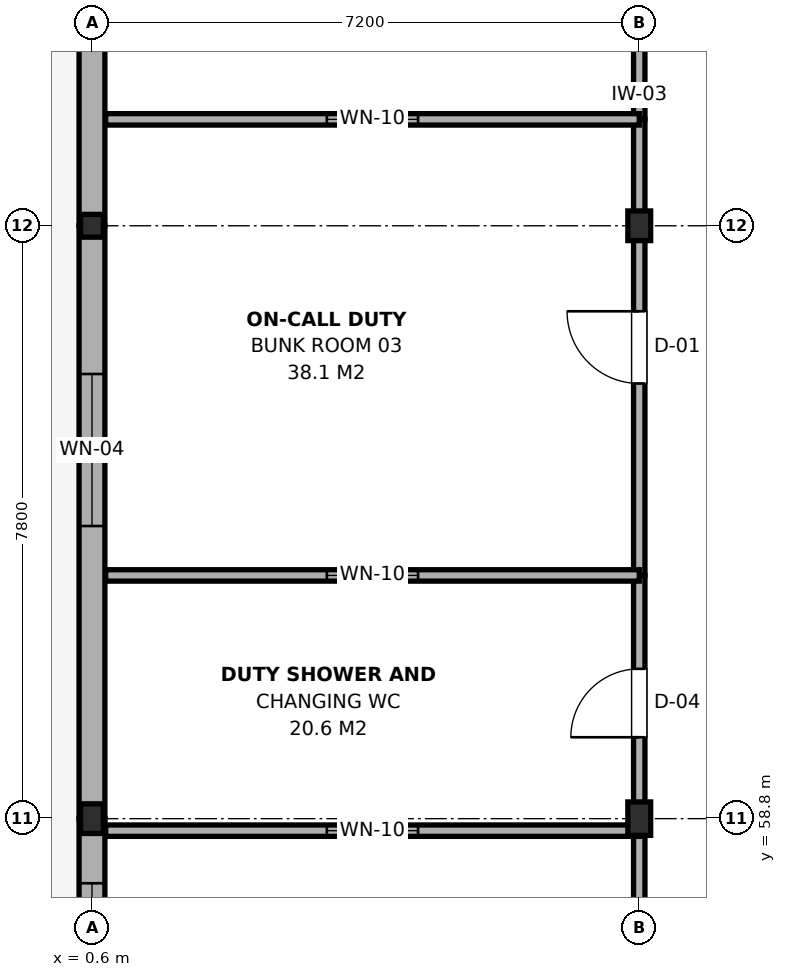
"""IFC4 building model, lengths in metres.
Left out: names, types, materials, properties, quantities, classifications, styles, units other than length and angle.
Written with IfcOpenShell. Run it as: python <this file> out.ifc"""

import sys

from ifc_helpers import new_model, si_unit, direction, frame, frame_2d, origin, origin_2d, place, context, subcontext, project, spatial, rectangle, i_section, extrude, element, fill, save


model = new_model("IFC4")
c1 = context("Model", 3, precision=1e-05, world=origin(), true_north=direction((0.0, 1.0)))
c2 = subcontext(c1, "Body", "Model", "MODEL_VIEW")
j1 = project(units=[si_unit("LENGTHUNIT", "METRE"), si_unit("PLANEANGLEUNIT", "RADIAN")], contexts=[c1])
p1 = place(None, origin())
s1 = spatial("IfcSite", under=j1, at=p1, CompositionType="ELEMENT")
p2 = place(p1, origin())
s2 = spatial("IfcBuilding", under=s1, at=p2, CompositionType="ELEMENT")
p3 = place(p2, frame((0.0, 0.0, 24.9)))
s3 = spatial("IfcBuildingStorey", under=s2, at=p3, CompositionType="ELEMENT", Elevation=24.9)
p4 = place(p3, frame((0.6, 58.8, 0.0), z_axis=(0.0, 0.0, 1.0), x_axis=(1.0, 0.0, 0.0)))
e1 = element("IfcColumn", 1, at=p4, inside=s3, PredefinedType="COLUMN", context=c2, shape_type="SweptSolid", body=[
    extrude(i_section(OverallWidth=0.3, OverallDepth=0.39, WebThickness=0.011, FlangeThickness=0.019, FilletRadius=0.027, at=origin_2d()), origin(), (0.0, 0.0, 1.0), 3.9),
])
p5 = place(p3, frame((0.6, 66.6, 0.0), z_axis=(0.0, 0.0, 1.0), x_axis=(1.0, 0.0, 0.0)))
e2 = element("IfcColumn", 2, at=p5, inside=s3, PredefinedType="COLUMN", context=c2, shape_type="SweptSolid", body=[
    extrude(i_section(OverallWidth=0.3, OverallDepth=0.3, WebThickness=0.011, FlangeThickness=0.019, FilletRadius=0.027, at=origin_2d()), origin(), (0.0, 0.0, 1.0), 3.9),
])
p6 = place(p3, frame((7.8, 58.8, 0.0), z_axis=(0.0, 0.0, 1.0), x_axis=(1.0, 0.0, 0.0)))
e3 = element("IfcColumn", 3, at=p6, inside=s3, PredefinedType="COLUMN", context=c2, shape_type="SweptSolid", body=[
    extrude(i_section(OverallWidth=0.3, OverallDepth=0.44, WebThickness=0.011, FlangeThickness=0.021, FilletRadius=0.027, at=origin_2d()), origin(), (0.0, 0.0, 1.0), 3.9),
])
p7 = place(p3, frame((7.8, 66.6, 0.0), z_axis=(0.0, 0.0, 1.0), x_axis=(1.0, 0.0, 0.0)))
e4 = element("IfcColumn", 4, at=p7, inside=s3, PredefinedType="COLUMN", context=c2, shape_type="SweptSolid", body=[
    extrude(i_section(OverallWidth=0.3, OverallDepth=0.39, WebThickness=0.011, FlangeThickness=0.019, FilletRadius=0.027, at=origin_2d()), origin(), (0.0, 0.0, 1.0), 3.9),
])
p8 = place(p3, frame((0.6, 53.2, 0.0), z_axis=(0.0, 0.0, 1.0), x_axis=(0.0, 1.0, 0.0)))
e5 = element("IfcWall", 5, at=p8, inside=s3, PredefinedType="SOLIDWALL", context=c2, shape_type="SweptSolid", body=[
    extrude(rectangle(XDim=5.6, YDim=0.34, at=frame_2d((2.8, 0.0))), origin(), (0.0, 0.0, 1.0), 3.115),
])
p9 = place(p8, frame((2.75, 0.0, 0.9)))
e6 = element("IfcOpeningElement", 6, at=p9, cuts=e5, PredefinedType="OPENING", context=c2, shape_type="SweptSolid", body=[
    extrude(rectangle(XDim=2.0, YDim=1.8, at=frame_2d((1.0, 0.9))), frame((0.0, 0.185, 0.0), z_axis=(0.0, -1.0, 0.0), x_axis=(1.0, 0.0, 0.0)), (0.0, 0.0, 1.0), 0.37),
])
p10 = place(p3, frame((0.6, 58.8, 0.0), z_axis=(0.0, 0.0, 1.0), x_axis=(0.0, 1.0, 0.0)))
e7 = element("IfcWall", 7, at=p10, inside=s3, PredefinedType="SOLIDWALL", context=c2, shape_type="SweptSolid", body=[
    extrude(rectangle(XDim=7.8, YDim=0.34, at=frame_2d((3.9, 0.0))), origin(), (0.0, 0.0, 1.0), 3.115),
])
p11 = place(p10, frame((3.85, 0.0, 0.9)))
e8 = element("IfcOpeningElement", 8, at=p11, cuts=e7, PredefinedType="OPENING", context=c2, shape_type="SweptSolid", body=[
    extrude(rectangle(XDim=2.0, YDim=1.8, at=frame_2d((1.0, 0.9))), frame((0.0, 0.185, 0.0), z_axis=(0.0, -1.0, 0.0), x_axis=(1.0, 0.0, 0.0)), (0.0, 0.0, 1.0), 0.37),
])
p12 = place(p3, frame((0.6, 66.6, 0.0), z_axis=(0.0, 0.0, 1.0), x_axis=(0.0, 1.0, 0.0)))
e9 = element("IfcWall", 9, at=p12, inside=s3, PredefinedType="SOLIDWALL", context=c2, shape_type="SweptSolid", body=[
    extrude(rectangle(XDim=7.2, YDim=0.34, at=frame_2d((3.6, 0.0))), origin(), (0.0, 0.0, 1.0), 3.165),
])
p13 = place(p12, frame((2.6, 0.0, 0.9)))
e10 = element("IfcOpeningElement", 10, at=p13, cuts=e9, PredefinedType="OPENING", context=c2, shape_type="SweptSolid", body=[
    extrude(rectangle(XDim=2.0, YDim=1.8, at=frame_2d((1.0, 0.9))), frame((0.0, 0.185, 0.0), z_axis=(0.0, -1.0, 0.0), x_axis=(1.0, 0.0, 0.0)), (0.0, 0.0, 1.0), 0.37),
])
p14 = place(p3, frame((7.8, 55.2, 0.0), z_axis=(0.0, 0.0, 1.0), x_axis=(0.0, 1.0, 0.0)))
e11 = element("IfcWall", 11, at=p14, inside=s3, PredefinedType="PARTITIONING", context=c2, shape_type="SweptSolid", body=[
    extrude(rectangle(XDim=3.442, YDim=0.15, at=frame_2d((1.721, 0.0))), origin(), (0.0, 0.0, 1.0), 3.165),
])
p15 = place(p14, frame((1.246, 0.0, 0.0)))
e12 = element("IfcOpeningElement", 12, at=p15, cuts=e11, PredefinedType="OPENING", context=c2, shape_type="SweptSolid", body=[
    extrude(rectangle(XDim=0.95, YDim=2.15, at=frame_2d((0.475, 1.075))), frame((0.0, 0.09, 0.0), z_axis=(0.0, -1.0, 0.0), x_axis=(1.0, 0.0, 0.0)), (0.0, 0.0, 1.0), 0.18),
])
p16 = place(p3, frame((0.78, 58.642, 0.0), z_axis=(0.0, 0.0, 1.0), x_axis=(1.0, 0.0, 0.0)))
e13 = element("IfcWall", 13, at=p16, inside=s3, PredefinedType="PARTITIONING", context=c2, shape_type="SweptSolid", body=[
    extrude(rectangle(XDim=7.02, YDim=0.15, at=frame_2d((3.51, 0.0))), origin(), (0.0, 0.0, 1.0), 3.115),
])
p17 = place(p16, frame((2.91, 0.0, 0.95)))
e14 = element("IfcOpeningElement", 14, at=p17, cuts=e13, PredefinedType="OPENING", context=c2, shape_type="SweptSolid", body=[
    extrude(rectangle(XDim=1.2, YDim=1.5, at=frame_2d((0.6, 0.75))), frame((0.0, 0.09, 0.0), z_axis=(0.0, -1.0, 0.0), x_axis=(1.0, 0.0, 0.0)), (0.0, 0.0, 1.0), 0.18),
])
p18 = place(p3, frame((7.8, 58.642, 0.0), z_axis=(0.0, 0.0, 1.0), x_axis=(0.0, 1.0, 0.0)))
e15 = element("IfcWall", 15, at=p18, inside=s3, PredefinedType="PARTITIONING", context=c2, shape_type="SweptSolid", body=[
    extrude(rectangle(XDim=3.358, YDim=0.15, at=frame_2d((1.679, 0.0))), origin(), (0.0, 0.0, 1.0), 3.165),
])
p19 = place(p18, frame((1.229, 0.0, 0.0)))
e16 = element("IfcOpeningElement", 16, at=p19, cuts=e15, PredefinedType="OPENING", context=c2, shape_type="SweptSolid", body=[
    extrude(rectangle(XDim=0.9, YDim=2.15, at=frame_2d((0.45, 1.075))), frame((0.0, 0.09, 0.0), z_axis=(0.0, -1.0, 0.0), x_axis=(1.0, 0.0, 0.0)), (0.0, 0.0, 1.0), 0.18),
])
p20 = place(p3, frame((7.8, 62.0, 0.0), z_axis=(0.0, 0.0, 1.0), x_axis=(0.0, 1.0, 0.0)))
e17 = element("IfcWall", 17, at=p20, inside=s3, PredefinedType="PARTITIONING", context=c2, shape_type="SweptSolid", body=[
    extrude(rectangle(XDim=6.0, YDim=0.15, at=frame_2d((3.0, 0.0))), origin(), (0.0, 0.0, 1.0), 3.115),
])
p21 = place(p20, frame((2.525, 0.0, 0.0)))
e18 = element("IfcOpeningElement", 18, at=p21, cuts=e17, PredefinedType="OPENING", context=c2, shape_type="SweptSolid", body=[
    extrude(rectangle(XDim=0.95, YDim=2.15, at=frame_2d((0.475, 1.075))), frame((0.0, 0.09, 0.0), z_axis=(0.0, -1.0, 0.0), x_axis=(1.0, 0.0, 0.0)), (0.0, 0.0, 1.0), 0.18),
])
p22 = place(p3, frame((0.78, 62.0, 0.0), z_axis=(0.0, 0.0, 1.0), x_axis=(1.0, 0.0, 0.0)))
e19 = element("IfcWall", 19, at=p22, inside=s3, PredefinedType="PARTITIONING", context=c2, shape_type="SweptSolid", body=[
    extrude(rectangle(XDim=7.02, YDim=0.15, at=frame_2d((3.51, 0.0))), origin(), (0.0, 0.0, 1.0), 3.165),
])
p23 = place(p22, frame((2.91, 0.0, 0.95)))
e20 = element("IfcOpeningElement", 20, at=p23, cuts=e19, PredefinedType="OPENING", context=c2, shape_type="SweptSolid", body=[
    extrude(rectangle(XDim=1.2, YDim=1.5, at=frame_2d((0.6, 0.75))), frame((0.0, 0.09, 0.0), z_axis=(0.0, -1.0, 0.0), x_axis=(1.0, 0.0, 0.0)), (0.0, 0.0, 1.0), 0.18),
])
p24 = place(p3, frame((7.8, 68.0, 0.0), z_axis=(0.0, 0.0, 1.0), x_axis=(0.0, 1.0, 0.0)))
e21 = element("IfcWall", 21, at=p24, inside=s3, PredefinedType="PARTITIONING", context=c2, shape_type="SweptSolid", body=[
    extrude(rectangle(XDim=5.8, YDim=0.15, at=frame_2d((2.9, 0.0))), origin(), (0.0, 0.0, 1.0), 3.265),
])
p25 = place(p24, frame((2.425, 0.0, 0.0)))
e22 = element("IfcOpeningElement", 22, at=p25, cuts=e21, PredefinedType="OPENING", context=c2, shape_type="SweptSolid", body=[
    extrude(rectangle(XDim=0.95, YDim=2.15, at=frame_2d((0.475, 1.075))), frame((0.0, 0.09, 0.0), z_axis=(0.0, -1.0, 0.0), x_axis=(1.0, 0.0, 0.0)), (0.0, 0.0, 1.0), 0.18),
])
p26 = place(p3, frame((0.78, 68.0, 0.0), z_axis=(0.0, 0.0, 1.0), x_axis=(1.0, 0.0, 0.0)))
e23 = element("IfcWall", 23, at=p26, inside=s3, PredefinedType="PARTITIONING", context=c2, shape_type="SweptSolid", body=[
    extrude(rectangle(XDim=7.02, YDim=0.15, at=frame_2d((3.51, 0.0))), origin(), (0.0, 0.0, 1.0), 3.215),
])
p27 = place(p26, frame((2.91, 0.0, 0.95)))
e24 = element("IfcOpeningElement", 24, at=p27, cuts=e23, PredefinedType="OPENING", context=c2, shape_type="SweptSolid", body=[
    extrude(rectangle(XDim=1.2, YDim=1.5, at=frame_2d((0.6, 0.75))), frame((0.0, 0.09, 0.0), z_axis=(0.0, -1.0, 0.0), x_axis=(1.0, 0.0, 0.0)), (0.0, 0.0, 1.0), 0.18),
])
p28 = place(p9, origin())
e25 = element("IfcWindow", 25, at=p28, inside=s3, PartitioningType="SINGLE_PANEL", PredefinedType="WINDOW", context=c2, shape_type="SweptSolid", body=[
    extrude(rectangle(XDim=2.0, YDim=1.8, at=frame_2d((1.0, 0.9))), frame((0.0, 0.03, 0.0), z_axis=(0.0, -1.0, 0.0), x_axis=(1.0, 0.0, 0.0)), (0.0, 0.0, 1.0), 0.06),
])
fill(e6, e25)
p29 = place(p11, origin())
e26 = element("IfcWindow", 26, at=p29, inside=s3, PartitioningType="SINGLE_PANEL", PredefinedType="WINDOW", context=c2, shape_type="SweptSolid", body=[
    extrude(rectangle(XDim=2.0, YDim=1.8, at=frame_2d((1.0, 0.9))), frame((0.0, 0.03, 0.0), z_axis=(0.0, -1.0, 0.0), x_axis=(1.0, 0.0, 0.0)), (0.0, 0.0, 1.0), 0.06),
])
fill(e8, e26)
p30 = place(p17, origin())
e27 = element("IfcWindow", 27, at=p30, inside=s3, PartitioningType="SINGLE_PANEL", PredefinedType="WINDOW", context=c2, shape_type="SweptSolid", body=[
    extrude(rectangle(XDim=1.2, YDim=1.5, at=frame_2d((0.6, 0.75))), frame((0.0, 0.03, 0.0), z_axis=(0.0, -1.0, 0.0), x_axis=(1.0, 0.0, 0.0)), (0.0, 0.0, 1.0), 0.06),
])
fill(e14, e27)
p31 = place(p19, origin())
e28 = element("IfcDoor", 28, at=p31, inside=s3, OperationType="SINGLE_SWING_LEFT", PredefinedType="DOOR", context=c2, shape_type="SweptSolid", body=[
    extrude(rectangle(XDim=0.9, YDim=2.15, at=frame_2d((0.45, 1.075))), frame((0.0, 0.025, 0.0), z_axis=(0.0, -1.0, 0.0), x_axis=(1.0, 0.0, 0.0)), (0.0, 0.0, 1.0), 0.05),
])
fill(e16, e28)
p32 = place(p21, origin())
e29 = element("IfcDoor", 29, at=p32, inside=s3, OperationType="SINGLE_SWING_RIGHT", PredefinedType="DOOR", context=c2, shape_type="SweptSolid", body=[
    extrude(rectangle(XDim=0.95, YDim=2.15, at=frame_2d((0.475, 1.075))), frame((0.0, 0.025, 0.0), z_axis=(0.0, -1.0, 0.0), x_axis=(1.0, 0.0, 0.0)), (0.0, 0.0, 1.0), 0.05),
])
fill(e18, e29)
p33 = place(p23, origin())
e30 = element("IfcWindow", 30, at=p33, inside=s3, PartitioningType="SINGLE_PANEL", PredefinedType="WINDOW", context=c2, shape_type="SweptSolid", body=[
    extrude(rectangle(XDim=1.2, YDim=1.5, at=frame_2d((0.6, 0.75))), frame((0.0, 0.03, 0.0), z_axis=(0.0, -1.0, 0.0), x_axis=(1.0, 0.0, 0.0)), (0.0, 0.0, 1.0), 0.06),
])
fill(e20, e30)
p34 = place(p27, origin())
e31 = element("IfcWindow", 31, at=p34, inside=s3, PartitioningType="SINGLE_PANEL", PredefinedType="WINDOW", context=c2, shape_type="SweptSolid", body=[
    extrude(rectangle(XDim=1.2, YDim=1.5, at=frame_2d((0.6, 0.75))), frame((0.0, 0.03, 0.0), z_axis=(0.0, -1.0, 0.0), x_axis=(1.0, 0.0, 0.0)), (0.0, 0.0, 1.0), 0.06),
])
fill(e24, e31)
save(model, sys.argv[1])
